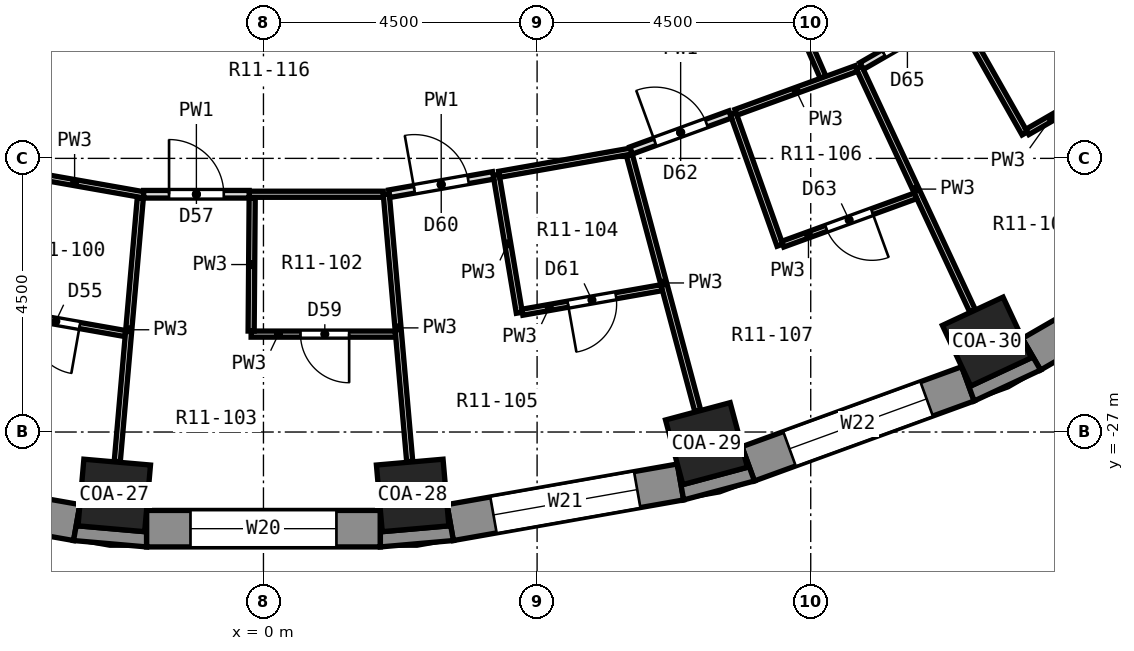
"""IFC4 building model, lengths in metres.
Left out: names, types, materials, properties, quantities, classifications, styles, units other than length and angle.
Written with IfcOpenShell. Run it as: python <this file> out.ifc"""

import sys

from ifc_helpers import new_model, si_unit, direction, frame, frame_2d, origin, origin_2d, place, context, subcontext, project, spatial, polyline, rectangle, outline, extrude, element, fill, save


model = new_model("IFC4")
c1 = context("Model", 3, precision=1e-05, world=origin(), true_north=direction((0.0, 1.0)))
c2 = subcontext(c1, "Body", "Model", "MODEL_VIEW")
j1 = project(units=[si_unit("LENGTHUNIT", "METRE"), si_unit("PLANEANGLEUNIT", "RADIAN")], contexts=[c1])
p1 = place(None, origin())
s1 = spatial("IfcSite", under=j1, at=p1, CompositionType="ELEMENT")
p2 = place(p1, origin())
s2 = spatial("IfcBuilding", under=s1, at=p2, CompositionType="ELEMENT")
p3 = place(p2, frame((0.0, 0.0, 46.1)))
s3 = spatial("IfcBuildingStorey", under=s2, at=p3, CompositionType="ELEMENT", Elevation=46.1)
for number, where, z_axis, x_axis in (
    (1, (-2.453, -28.043, 0.0), (0.0, 0.0, 1.0), (-0.087, -0.996, 0.0)),
    (2, (2.453, -28.043, 0.0), (0.0, 0.0, 1.0), (0.087, -0.996, 0.0)),
    (3, (7.286, -27.191, 0.0), (0.0, 0.0, 1.0), (0.259, -0.966, 0.0)),
    (4, (11.897, -25.512, 0.0), (0.0, 0.0, 1.0), (0.423, -0.906, 0.0)),
):
    element("IfcColumn", number, at=place(p3, frame(where, z_axis=z_axis, x_axis=x_axis)), inside=s3, PredefinedType="COLUMN", context=c2, shape_type="SweptSolid", body=[
        extrude(rectangle(XDim=1.1, YDim=1.1, at=origin_2d()), origin(), (0.0, 0.0, 1.0), 3.3),
    ])
p4 = place(p3, frame((-6.858, -27.821, 0.0), z_axis=(0.0, 0.0, 1.0), x_axis=(0.984800809218, -0.173687553279, 0.0)))
e5 = element("IfcWall", 5, at=p4, inside=s3, PredefinedType="SOLIDWALL", context=c2, shape_type="SweptSolid", body=[
    extrude(rectangle(XDim=3.846, YDim=0.6, at=frame_2d((1.923, 0.0))), origin(), (0.0, 0.0, 1.0), 2.75),
])
p5 = place(p4, frame((0.723, 0.0, 0.9)))
e6 = element("IfcOpeningElement", 6, at=p5, cuts=e5, PredefinedType="OPENING", context=c2, shape_type="SweptSolid", body=[
    extrude(rectangle(XDim=2.4, YDim=1.8, at=frame_2d((1.2, 0.9))), frame((0.0, 0.312, 0.0), z_axis=(0.0, -1.0, 0.0), x_axis=(1.0, 0.0, 0.0)), (0.0, 0.0, 1.0), 0.624),
])
p6 = place(p3, frame((-1.923, -28.59, 0.0), z_axis=(0.0, 0.0, 1.0), x_axis=(1.0, 0.0, 0.0)))
e7 = element("IfcWall", 7, at=p6, inside=s3, PredefinedType="SOLIDWALL", context=c2, shape_type="SweptSolid", body=[
    extrude(rectangle(XDim=3.846, YDim=0.6, at=frame_2d((1.923, 0.0))), origin(), (0.0, 0.0, 1.0), 2.75),
])
p7 = place(p6, frame((0.723, 0.0, 0.9)))
e8 = element("IfcOpeningElement", 8, at=p7, cuts=e7, PredefinedType="OPENING", context=c2, shape_type="SweptSolid", body=[
    extrude(rectangle(XDim=2.4, YDim=1.8, at=frame_2d((1.2, 0.9))), frame((0.0, 0.312, 0.0), z_axis=(0.0, -1.0, 0.0), x_axis=(1.0, 0.0, 0.0)), (0.0, 0.0, 1.0), 0.624),
])
p8 = place(p3, frame((3.071, -28.489, 0.0), z_axis=(0.0, 0.0, 1.0), x_axis=(0.984800809218, 0.173687553279, 0.0)))
e9 = element("IfcWall", 9, at=p8, inside=s3, PredefinedType="SOLIDWALL", context=c2, shape_type="SweptSolid", body=[
    extrude(rectangle(XDim=3.846, YDim=0.6, at=frame_2d((1.923, 0.0))), origin(), (0.0, 0.0, 1.0), 2.75),
])
p9 = place(p8, frame((0.723, 0.0, 0.9)))
e10 = element("IfcOpeningElement", 10, at=p9, cuts=e9, PredefinedType="OPENING", context=c2, shape_type="SweptSolid", body=[
    extrude(rectangle(XDim=2.4, YDim=1.8, at=frame_2d((1.2, 0.9))), frame((0.0, 0.312, 0.0), z_axis=(0.0, -1.0, 0.0), x_axis=(1.0, 0.0, 0.0)), (0.0, 0.0, 1.0), 0.624),
])
p10 = place(p3, frame((7.971, -27.523, 0.0), z_axis=(0.0, 0.0, 1.0), x_axis=(0.939689588564, 0.342028474173, 0.0)))
e11 = element("IfcWall", 11, at=p10, inside=s3, PredefinedType="SOLIDWALL", context=c2, shape_type="SweptSolid", body=[
    extrude(rectangle(XDim=3.846, YDim=0.6, at=frame_2d((1.923, 0.0))), origin(), (0.0, 0.0, 1.0), 2.75),
])
p11 = place(p10, frame((0.723, 0.0, 0.9)))
e12 = element("IfcOpeningElement", 12, at=p11, cuts=e11, PredefinedType="OPENING", context=c2, shape_type="SweptSolid", body=[
    extrude(rectangle(XDim=2.4, YDim=1.8, at=frame_2d((1.2, 0.9))), frame((0.0, 0.312, 0.0), z_axis=(0.0, -1.0, 0.0), x_axis=(1.0, 0.0, 0.0)), (0.0, 0.0, 1.0), 0.624),
])
p12 = place(p3, frame((12.63, -25.721, 0.0), z_axis=(0.0, 0.0, 1.0), x_axis=(0.86603124159, 0.499989888488, 0.0)))
e13 = element("IfcWall", 13, at=p12, inside=s3, PredefinedType="SOLIDWALL", context=c2, shape_type="SweptSolid", body=[
    extrude(rectangle(XDim=3.846, YDim=0.6, at=frame_2d((1.923, 0.0))), origin(), (0.0, 0.0, 1.0), 2.75),
])
p13 = place(p12, frame((0.723, 0.0, 0.9)))
e14 = element("IfcOpeningElement", 14, at=p13, cuts=e13, PredefinedType="OPENING", context=c2, shape_type="SweptSolid", body=[
    extrude(rectangle(XDim=2.4, YDim=1.8, at=frame_2d((1.2, 0.9))), frame((0.0, 0.312, 0.0), z_axis=(0.0, -1.0, 0.0), x_axis=(1.0, 0.0, 0.0)), (0.0, 0.0, 1.0), 0.624),
])
p14 = place(p3, origin())
e15 = element("IfcWall", 15, at=p14, inside=s3, PredefinedType="SOLIDWALL", context=c2, shape_type="SweptSolid", body=[
    extrude(outline(polyline([(-3.123, -28.785), (-1.923, -28.89), (-1.923, -28.29), (-1.954, -28.639), (-3.049, -28.543), (-3.019, -28.194), (-3.123, -28.785)])), origin(), (0.0, 0.0, 1.0), 2.75),
])
p15 = place(p3, origin())
e16 = element("IfcWall", 16, at=p15, inside=s3, PredefinedType="SOLIDWALL", context=c2, shape_type="SweptSolid", body=[
    extrude(outline(polyline([(1.923, -28.89), (3.123, -28.785), (3.019, -28.194), (3.049, -28.543), (1.954, -28.639), (1.923, -28.29), (1.923, -28.89)])), origin(), (0.0, 0.0, 1.0), 2.75),
])
p16 = place(p3, origin())
e17 = element("IfcWall", 17, at=p16, inside=s3, PredefinedType="SOLIDWALL", context=c2, shape_type="SweptSolid", body=[
    extrude(outline(polyline([(6.91, -28.117), (8.074, -27.805), (7.869, -27.241), (7.959, -27.58), (6.897, -27.865), (6.806, -27.526), (6.91, -28.117)])), origin(), (0.0, 0.0, 1.0), 2.75),
])
p17 = place(p3, origin())
e18 = element("IfcWall", 18, at=p17, inside=s3, PredefinedType="SOLIDWALL", context=c2, shape_type="SweptSolid", body=[
    extrude(outline(polyline([(12.78, -25.981), (12.479, -25.461), (12.628, -25.779), (11.631, -26.243), (11.483, -25.926), (11.688, -26.49), (12.78, -25.981)])), origin(), (0.0, 0.0, 1.0), 2.75),
])
p18 = place(p3, frame((2.02, -23.09, 0.0), z_axis=(0.0, 0.0, 1.0), x_axis=(0.087326902968, -0.996179708696, 0.0)))
e19 = element("IfcWall", 19, at=p18, inside=s3, PredefinedType="PARTITIONING", context=c2, shape_type="SweptSolid", body=[
    extrude(rectangle(XDim=4.412, YDim=0.1, at=frame_2d((2.206, 0.0))), origin(), (0.0, 0.0, 1.0), 2.75),
])
p19 = place(p3, frame((3.827, -22.771, 0.0), z_axis=(0.0, 0.0, 1.0), x_axis=(0.165707124798, -0.98617500921, 0.0)))
e20 = element("IfcWall", 20, at=p19, inside=s3, PredefinedType="PARTITIONING", context=c2, shape_type="SweptSolid", body=[
    extrude(rectangle(XDim=2.3, YDim=0.1, at=frame_2d((1.15, 0.0))), origin(), (0.0, 0.0, 1.0), 2.75),
])
p20 = place(p3, frame((6.018, -22.448, 0.0), z_axis=(0.0, 0.0, 1.0), x_axis=(0.258193625059, -0.966093190111, 0.0)))
e21 = element("IfcWall", 21, at=p20, inside=s3, PredefinedType="PARTITIONING", context=c2, shape_type="SweptSolid", body=[
    extrude(rectangle(XDim=4.35, YDim=0.1, at=frame_2d((2.175, 0.0))), origin(), (0.0, 0.0, 1.0), 2.75),
])
p21 = place(p3, frame((7.723, -21.76, 0.0), z_axis=(0.0, 0.0, 1.0), x_axis=(0.334695622164, -0.942326291952, 0.0)))
e22 = element("IfcWall", 22, at=p21, inside=s3, PredefinedType="PARTITIONING", context=c2, shape_type="SweptSolid", body=[
    extrude(rectangle(XDim=2.301, YDim=0.1, at=frame_2d((1.15, 0.0))), origin(), (0.0, 0.0, 1.0), 2.75),
])
p22 = place(p3, frame((7.65, -17.594, 0.0), z_axis=(0.0, 0.0, 1.0), x_axis=(0.398813158587, -0.917032204744, 0.0)))
e23 = element("IfcWall", 23, at=p22, inside=s3, PredefinedType="PARTITIONING", context=c2, shape_type="SweptSolid", body=[
    extrude(rectangle(XDim=3.897, YDim=0.1, at=frame_2d((1.948, 0.0))), origin(), (0.0, 0.0, 1.0), 2.75),
])
p23 = place(p22, frame((1.992, 0.0, 0.0)))
e24 = element("IfcOpeningElement", 24, at=p23, cuts=e23, PredefinedType="OPENING", context=c2, shape_type="SweptSolid", body=[
    extrude(rectangle(XDim=0.9, YDim=2.1, at=frame_2d((0.45, 1.05))), frame((0.0, 0.062, 0.0), z_axis=(0.0, -1.0, 0.0), x_axis=(1.0, 0.0, 0.0)), (0.0, 0.0, 1.0), 0.124),
])
p24 = place(p3, frame((9.795, -21.006, 0.0), z_axis=(0.0, 0.0, 1.0), x_axis=(0.422658280027, -0.906289125127, 0.0)))
e25 = element("IfcWall", 25, at=p24, inside=s3, PredefinedType="PARTITIONING", context=c2, shape_type="SweptSolid", body=[
    extrude(rectangle(XDim=4.413, YDim=0.1, at=frame_2d((2.206, 0.0))), origin(), (0.0, 0.0, 1.0), 2.75),
])
p25 = place(p3, frame((11.385, -20.089, 0.0), z_axis=(0.0, 0.0, 1.0), x_axis=(0.49306078006, -0.869994866173, 0.0)))
e26 = element("IfcWall", 26, at=p25, inside=s3, PredefinedType="PARTITIONING", context=c2, shape_type="SweptSolid", body=[
    extrude(rectangle(XDim=2.3, YDim=0.1, at=frame_2d((1.15, 0.0))), origin(), (0.0, 0.0, 1.0), 2.75),
])
p26 = place(p3, frame((-4.609, -24.969, 0.0), z_axis=(0.0, 0.0, 1.0), x_axis=(0.984808388541, -0.173644573363, 0.0)))
e27 = element("IfcWall", 27, at=p26, inside=s3, PredefinedType="PARTITIONING", context=c2, shape_type="SweptSolid", body=[
    extrude(rectangle(XDim=2.375, YDim=0.1, at=frame_2d((1.188, 0.0))), origin(), (0.0, 0.0, 1.0), 2.75),
])
p27 = place(p26, frame((0.812, 0.0, 0.0)))
e28 = element("IfcOpeningElement", 28, at=p27, cuts=e27, PredefinedType="OPENING", context=c2, shape_type="SweptSolid", body=[
    extrude(rectangle(XDim=0.8, YDim=2.1, at=frame_2d((0.4, 1.05))), frame((0.0, 0.062, 0.0), z_axis=(0.0, -1.0, 0.0), x_axis=(1.0, 0.0, 0.0)), (0.0, 0.0, 1.0), 0.124),
])
p28 = place(p3, frame((-4.241, -22.698, 0.0), z_axis=(0.0, 0.0, 1.0), x_axis=(0.984796344358, -0.173712866935, 0.0)))
e29 = element("IfcWall", 29, at=p28, inside=s3, PredefinedType="PARTITIONING", context=c2, shape_type="SweptSolid", body=[
    extrude(rectangle(XDim=2.306, YDim=0.1, at=frame_2d((1.153, 0.0))), origin(), (0.0, 0.0, 1.0), 2.75),
])
p29 = place(p3, frame((-0.203, -25.39, 0.0), z_axis=(0.0, 0.0, 1.0), x_axis=(1.0, 0.0, 0.0)))
e30 = element("IfcWall", 30, at=p29, inside=s3, PredefinedType="PARTITIONING", context=c2, shape_type="SweptSolid", body=[
    extrude(rectangle(XDim=2.374, YDim=0.1, at=frame_2d((1.187, 0.0))), origin(), (0.0, 0.0, 1.0), 2.75),
])
p30 = place(p29, frame((0.812, 0.0, 0.0)))
e31 = element("IfcOpeningElement", 31, at=p30, cuts=e30, PredefinedType="OPENING", context=c2, shape_type="SweptSolid", body=[
    extrude(rectangle(XDim=0.8, YDim=2.1, at=frame_2d((0.4, 1.05))), frame((0.0, 0.062, 0.0), z_axis=(0.0, -1.0, 0.0), x_axis=(1.0, 0.0, 0.0)), (0.0, 0.0, 1.0), 0.124),
])
p31 = place(p3, frame((-0.235, -23.09, 0.0), z_axis=(0.0, 0.0, 1.0), x_axis=(1.0, 0.0, 0.0)))
e32 = element("IfcWall", 32, at=p31, inside=s3, PredefinedType="PARTITIONING", context=c2, shape_type="SweptSolid", body=[
    extrude(rectangle(XDim=2.205, YDim=0.1, at=frame_2d((1.103, 0.0))), origin(), (0.0, 0.0, 1.0), 2.75),
])
p32 = place(p3, frame((-1.97, -23.09, 0.0), z_axis=(0.0, 0.0, 1.0), x_axis=(1.0, 0.0, 0.0)))
e33 = element("IfcWall", 33, at=p32, inside=s3, PredefinedType="PARTITIONING", context=c2, shape_type="SweptSolid", body=[
    extrude(rectangle(XDim=1.735, YDim=0.125, at=frame_2d((0.867, 0.0))), origin(), (0.0, 0.0, 1.0), 2.75),
])
p33 = place(p32, frame((0.417, 0.0, 0.0)))
e34 = element("IfcOpeningElement", 34, at=p33, cuts=e33, PredefinedType="OPENING", context=c2, shape_type="SweptSolid", body=[
    extrude(rectangle(XDim=0.9, YDim=2.1, at=frame_2d((0.45, 1.05))), frame((0.0, 0.074, 0.0), z_axis=(0.0, -1.0, 0.0), x_axis=(1.0, 0.0, 0.0)), (0.0, 0.0, 1.0), 0.149),
])
p34 = place(p3, frame((4.257, -25.03, 0.0), z_axis=(0.0, 0.0, 1.0), x_axis=(0.984818426074, 0.173587636842, 0.0)))
e35 = element("IfcWall", 35, at=p34, inside=s3, PredefinedType="PARTITIONING", context=c2, shape_type="SweptSolid", body=[
    extrude(rectangle(XDim=2.325, YDim=0.1, at=frame_2d((1.163, 0.0))), origin(), (0.0, 0.0, 1.0), 2.75),
])
p35 = place(p34, frame((0.762, 0.0, 0.0)))
e36 = element("IfcOpeningElement", 36, at=p35, cuts=e35, PredefinedType="OPENING", context=c2, shape_type="SweptSolid", body=[
    extrude(rectangle(XDim=0.8, YDim=2.1, at=frame_2d((0.4, 1.05))), frame((0.0, 0.062, 0.0), z_axis=(0.0, -1.0, 0.0), x_axis=(1.0, 0.0, 0.0)), (0.0, 0.0, 1.0), 0.124),
])
p36 = place(p3, frame((3.876, -22.762, 0.0), z_axis=(0.0, 0.0, 1.0), x_axis=(0.98481362095, 0.173614895648, 0.0)))
e37 = element("IfcWall", 37, at=p36, inside=s3, PredefinedType="PARTITIONING", context=c2, shape_type="SweptSolid", body=[
    extrude(rectangle(XDim=2.206, YDim=0.1, at=frame_2d((1.103, 0.0))), origin(), (0.0, 0.0, 1.0), 2.75),
])
p37 = place(p3, frame((2.069, -23.081, 0.0), z_axis=(0.0, 0.0, 1.0), x_axis=(0.984782142107, 0.173793361747, 0.0)))
e38 = element("IfcWall", 38, at=p37, inside=s3, PredefinedType="PARTITIONING", context=c2, shape_type="SweptSolid", body=[
    extrude(rectangle(XDim=1.735, YDim=0.125, at=frame_2d((0.867, 0.0))), origin(), (0.0, 0.0, 1.0), 2.75),
])
p38 = place(p37, frame((0.417, 0.0, 0.0)))
e39 = element("IfcOpeningElement", 39, at=p38, cuts=e38, PredefinedType="OPENING", context=c2, shape_type="SweptSolid", body=[
    extrude(rectangle(XDim=0.9, YDim=2.1, at=frame_2d((0.45, 1.05))), frame((0.0, 0.074, 0.0), z_axis=(0.0, -1.0, 0.0), x_axis=(1.0, 0.0, 0.0)), (0.0, 0.0, 1.0), 0.149),
])
p39 = place(p3, frame((8.54, -23.911, 0.0), z_axis=(0.0, 0.0, 1.0), x_axis=(0.939716717369, 0.34195393125, 0.0)))
e40 = element("IfcWall", 40, at=p39, inside=s3, PredefinedType="PARTITIONING", context=c2, shape_type="SweptSolid", body=[
    extrude(rectangle(XDim=2.324, YDim=0.1, at=frame_2d((1.162, 0.0))), origin(), (0.0, 0.0, 1.0), 2.75),
])
p40 = place(p39, frame((0.762, 0.0, 0.0)))
e41 = element("IfcOpeningElement", 41, at=p40, cuts=e40, PredefinedType="OPENING", context=c2, shape_type="SweptSolid", body=[
    extrude(rectangle(XDim=0.8, YDim=2.1, at=frame_2d((0.4, 1.05))), frame((0.0, 0.062, 0.0), z_axis=(0.0, -1.0, 0.0), x_axis=(1.0, 0.0, 0.0)), (0.0, 0.0, 1.0), 0.124),
])
p41 = place(p3, frame((7.77, -21.743, 0.0), z_axis=(0.0, 0.0, 1.0), x_axis=(0.939725675468, 0.341929312674, 0.0)))
e42 = element("IfcWall", 42, at=p41, inside=s3, PredefinedType="PARTITIONING", context=c2, shape_type="SweptSolid", body=[
    extrude(rectangle(XDim=2.105, YDim=0.1, at=frame_2d((1.052, 0.0))), origin(), (0.0, 0.0, 1.0), 2.75),
])
p42 = place(p3, frame((6.046, -22.371, 0.0), z_axis=(0.0, 0.0, 1.0), x_axis=(0.939612508188, 0.342240170722, 0.0)))
e43 = element("IfcWall", 43, at=p42, inside=s3, PredefinedType="PARTITIONING", context=c2, shape_type="SweptSolid", body=[
    extrude(rectangle(XDim=1.735, YDim=0.125, at=frame_2d((0.867, 0.0))), origin(), (0.0, 0.0, 1.0), 2.75),
])
p43 = place(p42, frame((0.417, 0.0, 0.0)))
e44 = element("IfcOpeningElement", 44, at=p43, cuts=e43, PredefinedType="OPENING", context=c2, shape_type="SweptSolid", body=[
    extrude(rectangle(XDim=0.9, YDim=2.1, at=frame_2d((0.45, 1.05))), frame((0.0, 0.074, 0.0), z_axis=(0.0, -1.0, 0.0), x_axis=(1.0, 0.0, 0.0)), (0.0, 0.0, 1.0), 0.149),
])
p44 = place(p3, frame((12.562, -22.065, 0.0), z_axis=(0.0, 0.0, 1.0), x_axis=(0.865919666768, 0.50018309718, 0.0)))
e45 = element("IfcWall", 45, at=p44, inside=s3, PredefinedType="PARTITIONING", context=c2, shape_type="SweptSolid", body=[
    extrude(rectangle(XDim=2.324, YDim=0.1, at=frame_2d((1.162, 0.0))), origin(), (0.0, 0.0, 1.0), 2.75),
])
p45 = place(p44, frame((0.762, 0.0, 0.0)))
e46 = element("IfcOpeningElement", 46, at=p45, cuts=e45, PredefinedType="OPENING", context=c2, shape_type="SweptSolid", body=[
    extrude(rectangle(XDim=0.8, YDim=2.1, at=frame_2d((0.4, 1.05))), frame((0.0, 0.062, 0.0), z_axis=(0.0, -1.0, 0.0), x_axis=(1.0, 0.0, 0.0)), (0.0, 0.0, 1.0), 0.124),
])
p46 = place(p3, frame((9.838, -20.981, 0.0), z_axis=(0.0, 0.0, 1.0), x_axis=(0.866288616225, 0.499543825303, 0.0)))
e47 = element("IfcWall", 47, at=p46, inside=s3, PredefinedType="PARTITIONING", context=c2, shape_type="SweptSolid", body=[
    extrude(rectangle(XDim=1.735, YDim=0.125, at=frame_2d((0.868, 0.0))), origin(), (0.0, 0.0, 1.0), 2.75),
])
p47 = place(p46, frame((0.418, 0.0, 0.0)))
e48 = element("IfcOpeningElement", 48, at=p47, cuts=e47, PredefinedType="OPENING", context=c2, shape_type="SweptSolid", body=[
    extrude(rectangle(XDim=0.9, YDim=2.1, at=frame_2d((0.45, 1.05))), frame((0.0, 0.074, 0.0), z_axis=(0.0, -1.0, 0.0), x_axis=(1.0, 0.0, 0.0)), (0.0, 0.0, 1.0), 0.149),
])
p48 = place(p3, frame((-2.404, -27.485, 0.0), z_axis=(0.0, 0.0, 1.0), x_axis=(0.087174609927, 0.996193047247, 0.0)))
e49 = element("IfcWall", 49, at=p48, inside=s3, PredefinedType="PARTITIONING", context=c2, shape_type="SweptSolid", body=[
    extrude(rectangle(XDim=4.349, YDim=0.1, at=frame_2d((2.175, 0.0))), origin(), (0.0, 0.0, 1.0), 2.75),
])
p49 = place(p3, frame((-0.203, -25.34, 0.0), z_axis=(0.0, 0.0, 1.0), x_axis=(0.007812261592, 0.999969483819, 0.0)))
e50 = element("IfcWall", 50, at=p49, inside=s3, PredefinedType="PARTITIONING", context=c2, shape_type="SweptSolid", body=[
    extrude(rectangle(XDim=2.188, YDim=0.1, at=frame_2d((1.094, 0.0))), origin(), (0.0, 0.0, 1.0), 2.75),
])
p50 = place(p7, origin())
e51 = element("IfcWindow", 51, at=p50, inside=s3, PartitioningType="SINGLE_PANEL", PredefinedType="WINDOW", context=c2, shape_type="SweptSolid", body=[
    extrude(rectangle(XDim=2.4, YDim=1.8, at=frame_2d((1.2, 0.9))), frame((0.0, 0.18, 0.0), z_axis=(0.0, -1.0, 0.0), x_axis=(1.0, 0.0, 0.0)), (0.0, 0.0, 1.0), 0.06),
])
fill(e8, e51)
p51 = place(p9, origin())
e52 = element("IfcWindow", 52, at=p51, inside=s3, PartitioningType="SINGLE_PANEL", PredefinedType="WINDOW", context=c2, shape_type="SweptSolid", body=[
    extrude(rectangle(XDim=2.4, YDim=1.8, at=frame_2d((1.2, 0.9))), frame((0.0, 0.18, 0.0), z_axis=(0.0, -1.0, 0.0), x_axis=(1.0, 0.0, 0.0)), (0.0, 0.0, 1.0), 0.06),
])
fill(e10, e52)
p52 = place(p11, origin())
e53 = element("IfcWindow", 53, at=p52, inside=s3, PartitioningType="SINGLE_PANEL", PredefinedType="WINDOW", context=c2, shape_type="SweptSolid", body=[
    extrude(rectangle(XDim=2.4, YDim=1.8, at=frame_2d((1.2, 0.9))), frame((0.0, 0.18, 0.0), z_axis=(0.0, -1.0, 0.0), x_axis=(1.0, 0.0, 0.0)), (0.0, 0.0, 1.0), 0.06),
])
fill(e12, e53)
p53 = place(p27, frame((0.8, 0.0, 0.0), z_axis=(0.0, 0.0, 1.0), x_axis=(-1.0, 0.0, 0.0)))
e54 = element("IfcDoor", 54, at=p53, inside=s3, OperationType="SINGLE_SWING_LEFT", PredefinedType="DOOR", context=c2, shape_type="SweptSolid", body=[
    extrude(rectangle(XDim=0.8, YDim=2.1, at=frame_2d((0.4, 1.05))), frame((0.0, 0.025, 0.0), z_axis=(0.0, -1.0, 0.0), x_axis=(1.0, 0.0, 0.0)), (0.0, 0.0, 1.0), 0.05),
])
fill(e28, e54)
p54 = place(p33, origin())
e55 = element("IfcDoor", 55, at=p54, inside=s3, OperationType="SINGLE_SWING_LEFT", PredefinedType="DOOR", context=c2, shape_type="SweptSolid", body=[
    extrude(rectangle(XDim=0.9, YDim=2.1, at=frame_2d((0.45, 1.05))), frame((0.0, 0.025, 0.0), z_axis=(0.0, -1.0, 0.0), x_axis=(1.0, 0.0, 0.0)), (0.0, 0.0, 1.0), 0.05),
])
fill(e34, e55)
p55 = place(p30, frame((0.8, 0.0, 0.0), z_axis=(0.0, 0.0, 1.0), x_axis=(-1.0, 0.0, 0.0)))
e56 = element("IfcDoor", 56, at=p55, inside=s3, OperationType="SINGLE_SWING_LEFT", PredefinedType="DOOR", context=c2, shape_type="SweptSolid", body=[
    extrude(rectangle(XDim=0.8, YDim=2.1, at=frame_2d((0.4, 1.05))), frame((0.0, 0.025, 0.0), z_axis=(0.0, -1.0, 0.0), x_axis=(1.0, 0.0, 0.0)), (0.0, 0.0, 1.0), 0.05),
])
fill(e31, e56)
p56 = place(p38, origin())
e57 = element("IfcDoor", 57, at=p56, inside=s3, OperationType="SINGLE_SWING_LEFT", PredefinedType="DOOR", context=c2, shape_type="SweptSolid", body=[
    extrude(rectangle(XDim=0.9, YDim=2.1, at=frame_2d((0.45, 1.05))), frame((0.0, 0.025, 0.0), z_axis=(0.0, -1.0, 0.0), x_axis=(1.0, 0.0, 0.0)), (0.0, 0.0, 1.0), 0.05),
])
fill(e39, e57)
p57 = place(p35, frame((0.8, 0.0, 0.0), z_axis=(0.0, 0.0, 1.0), x_axis=(-1.0, 0.0, 0.0)))
e58 = element("IfcDoor", 58, at=p57, inside=s3, OperationType="SINGLE_SWING_RIGHT", PredefinedType="DOOR", context=c2, shape_type="SweptSolid", body=[
    extrude(rectangle(XDim=0.8, YDim=2.1, at=frame_2d((0.4, 1.05))), frame((0.0, 0.025, 0.0), z_axis=(0.0, -1.0, 0.0), x_axis=(1.0, 0.0, 0.0)), (0.0, 0.0, 1.0), 0.05),
])
fill(e36, e58)
p58 = place(p43, origin())
e59 = element("IfcDoor", 59, at=p58, inside=s3, OperationType="SINGLE_SWING_LEFT", PredefinedType="DOOR", context=c2, shape_type="SweptSolid", body=[
    extrude(rectangle(XDim=0.9, YDim=2.1, at=frame_2d((0.45, 1.05))), frame((0.0, 0.025, 0.0), z_axis=(0.0, -1.0, 0.0), x_axis=(1.0, 0.0, 0.0)), (0.0, 0.0, 1.0), 0.05),
])
fill(e44, e59)
p59 = place(p40, frame((0.8, 0.0, 0.0), z_axis=(0.0, 0.0, 1.0), x_axis=(-1.0, 0.0, 0.0)))
e60 = element("IfcDoor", 60, at=p59, inside=s3, OperationType="SINGLE_SWING_LEFT", PredefinedType="DOOR", context=c2, shape_type="SweptSolid", body=[
    extrude(rectangle(XDim=0.8, YDim=2.1, at=frame_2d((0.4, 1.05))), frame((0.0, 0.025, 0.0), z_axis=(0.0, -1.0, 0.0), x_axis=(1.0, 0.0, 0.0)), (0.0, 0.0, 1.0), 0.05),
])
fill(e41, e60)
p60 = place(p47, origin())
e61 = element("IfcDoor", 61, at=p60, inside=s3, OperationType="SINGLE_SWING_LEFT", PredefinedType="DOOR", context=c2, shape_type="SweptSolid", body=[
    extrude(rectangle(XDim=0.9, YDim=2.1, at=frame_2d((0.45, 1.05))), frame((0.0, 0.025, 0.0), z_axis=(0.0, -1.0, 0.0), x_axis=(1.0, 0.0, 0.0)), (0.0, 0.0, 1.0), 0.05),
])
fill(e48, e61)
save(model, sys.argv[1])
